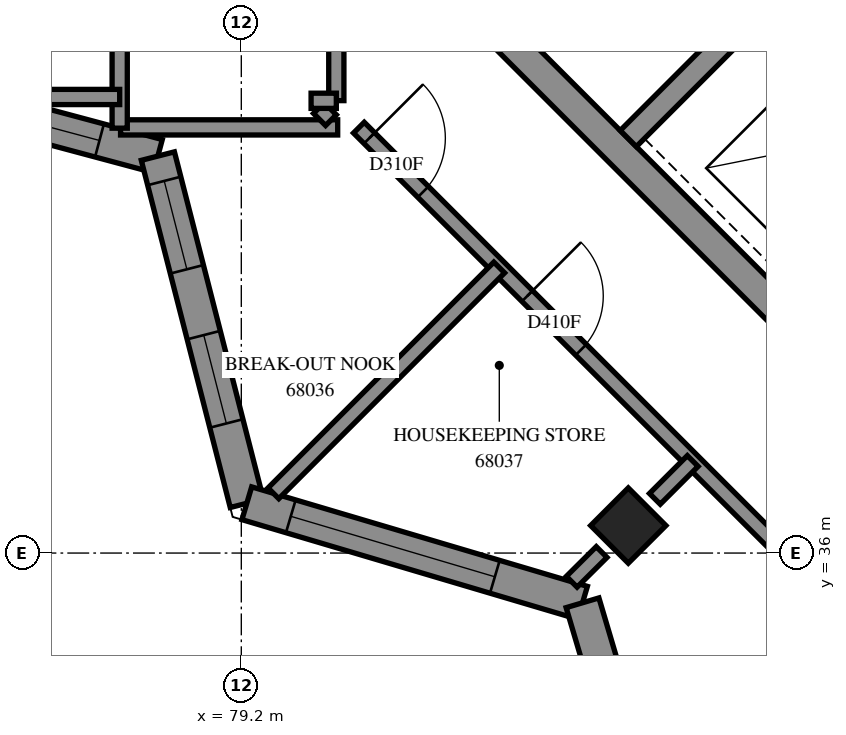
"""IFC4 building model, lengths in metres.
Left out: names, types, materials, properties, quantities, classifications, styles, units other than length and angle.
Written with IfcOpenShell. Run it as: python <this file> out.ifc"""

import sys

from ifc_helpers import new_model, si_unit, direction, frame, frame_2d, origin, origin_2d, place, context, subcontext, project, spatial, polyline, rectangle, outline, extrude, element, fill, save


model = new_model("IFC4")
c1 = context("Model", 3, precision=1e-05, world=origin(), true_north=direction((0.0, 1.0)))
c2 = subcontext(c1, "Body", "Model", "MODEL_VIEW")
j1 = project(units=[si_unit("LENGTHUNIT", "METRE"), si_unit("PLANEANGLEUNIT", "RADIAN")], contexts=[c1])
p1 = place(None, origin())
s1 = spatial("IfcSite", under=j1, at=p1, CompositionType="ELEMENT")
p2 = place(p1, origin())
s2 = spatial("IfcBuilding", under=s1, at=p2, CompositionType="ELEMENT")
p3 = place(p2, frame((0.0, 0.0, 250.6)))
s3 = spatial("IfcBuildingStorey", under=s2, at=p3, CompositionType="ELEMENT", Elevation=250.6)
p4 = place(p3, frame((84.291, 36.362, 0.0), z_axis=(0.0, 0.0, 1.0), x_axis=(0.7071067812, -0.7071067812, 0.0)))
e1 = element("IfcColumn", 1, at=p4, inside=s3, PredefinedType="COLUMN", context=c2, shape_type="SweptSolid", body=[
    extrude(rectangle(XDim=0.7, YDim=0.7, at=origin_2d()), origin(), (0.0, 0.0, 1.0), 3.1),
])
p5 = place(p3, frame((76.23, 49.231, -0.3), z_axis=(0.0, 0.0, 1.0), x_axis=(0.7071034917, -0.7071100706, 0.0)))
e2 = element("IfcWall", 2, at=p5, inside=s3, PredefinedType="SHEAR", context=c2, shape_type="SweptSolid", body=[
    extrude(rectangle(XDim=15.2, YDim=0.4, at=frame_2d((7.6, 0.0))), origin(), (0.0, 0.0, 1.0), 2.7),
])
p6 = place(p3, frame((84.291, 41.453, 0.0), z_axis=(0.0, 0.0, 1.0), x_axis=(0.7071067812, 0.7071067812, 0.0)))
e3 = element("IfcWall", 3, at=p6, inside=s3, PredefinedType="SOLIDWALL", context=c2, shape_type="SweptSolid", body=[
    extrude(rectangle(XDim=3.3, YDim=0.3, at=frame_2d((1.65, 0.0))), origin(), (0.0, 0.0, 1.0), 3.1),
])
p7 = place(p3, frame((78.988, 51.423, 0.0), z_axis=(0.0, 0.0, 1.0), x_axis=(0.7071067812, -0.7071067812, 0.0)))
e4 = element("IfcWall", 4, at=p7, inside=s3, PredefinedType="SOLIDWALL", context=c2, shape_type="SweptSolid", body=[
    extrude(rectangle(XDim=14.4, YDim=0.3, at=frame_2d((7.2, 0.0))), origin(), (0.0, 0.0, 1.0), 3.1),
])
p8 = place(p7, frame((1.35, 0.0, 0.0)))
e5 = element("IfcOpeningElement", 5, at=p8, cuts=e4, PredefinedType="OPENING", context=c2, shape_type="SweptSolid", body=[
    extrude(rectangle(XDim=0.9, YDim=2.1, at=frame_2d((0.45, 1.05))), frame((0.0, 0.16, 0.0), z_axis=(0.0, -1.0, 0.0), x_axis=(1.0, 0.0, 0.0)), (0.0, 0.0, 1.0), 0.32),
])
p9 = place(p7, frame((4.95, 0.0, 0.0)))
e6 = element("IfcOpeningElement", 6, at=p9, cuts=e4, PredefinedType="OPENING", context=c2, shape_type="SweptSolid", body=[
    extrude(rectangle(XDim=0.9, YDim=2.1, at=frame_2d((0.45, 1.05))), frame((0.0, 0.16, 0.0), z_axis=(0.0, -1.0, 0.0), x_axis=(1.0, 0.0, 0.0)), (0.0, 0.0, 1.0), 0.32),
])
p10 = place(p7, frame((8.55, 0.0, 0.0)))
e7 = element("IfcOpeningElement", 7, at=p10, cuts=e4, PredefinedType="OPENING", context=c2, shape_type="SweptSolid", body=[
    extrude(rectangle(XDim=0.9, YDim=2.1, at=frame_2d((0.45, 1.05))), frame((0.0, 0.16, 0.0), z_axis=(0.0, -1.0, 0.0), x_axis=(1.0, 0.0, 0.0)), (0.0, 0.0, 1.0), 0.32),
])
p11 = place(p7, frame((12.05, 0.0, 0.0)))
e8 = element("IfcOpeningElement", 8, at=p11, cuts=e4, PredefinedType="OPENING", context=c2, shape_type="SweptSolid", body=[
    extrude(rectangle(XDim=1.1, YDim=2.1, at=frame_2d((0.55, 1.05))), frame((0.0, 0.16, 0.0), z_axis=(0.0, -1.0, 0.0), x_axis=(1.0, 0.0, 0.0)), (0.0, 0.0, 1.0), 0.32),
])
p12 = place(p3, frame((74.346, 42.228, 0.0), z_axis=(0.0, 0.0, 1.0), x_axis=(0.9659805223, -0.2586148306, 0.0)))
e9 = element("IfcWall", 9, at=p12, inside=s3, PredefinedType="SOLIDWALL", context=c2, shape_type="SweptSolid", body=[
    extrude(outline(polyline([(0.041, -0.225), (3.757, -0.225), (4.02, 0.225), (-0.041, 0.225), (0.041, -0.225)])), origin(), (0.0, 0.0, 1.0), 3.1),
])
p13 = place(p12, frame((1.894, 0.0, 0.45)))
e10 = element("IfcOpeningElement", 10, at=p13, cuts=e9, PredefinedType="OPENING", context=c2, shape_type="SweptSolid", body=[
    extrude(rectangle(XDim=1.2, YDim=2.55, at=frame_2d((0.6, 1.275))), frame((0.0, 0.235, 0.0), z_axis=(0.0, -1.0, 0.0), x_axis=(1.0, 0.0, 0.0)), (0.0, 0.0, 1.0), 0.47),
])
p14 = place(p3, frame((78.102, 41.222, 0.0), z_axis=(0.0, 0.0, 1.0), x_axis=(0.2482207273, -0.9687034998, 0.0)))
e11 = element("IfcWall", 11, at=p14, inside=s3, PredefinedType="SOLIDWALL", context=c2, shape_type="SweptSolid", body=[
    extrude(outline(polyline([(0.132, -0.225), (4.842, -0.225), (4.587, 0.225), (-0.132, 0.225), (0.132, -0.225)])), origin(), (0.0, 0.0, 1.0), 3.1),
])
p15 = place(p14, frame((0.337, 0.0, 0.45)))
e12 = element("IfcOpeningElement", 12, at=p15, cuts=e11, PredefinedType="OPENING", context=c2, shape_type="SweptSolid", body=[
    extrude(rectangle(XDim=1.2, YDim=2.55, at=frame_2d((0.6, 1.275))), frame((0.0, 0.235, 0.0), z_axis=(0.0, -1.0, 0.0), x_axis=(1.0, 0.0, 0.0)), (0.0, 0.0, 1.0), 0.47),
])
p16 = place(p14, frame((2.431, 0.0, 0.45)))
e13 = element("IfcOpeningElement", 13, at=p16, cuts=e11, PredefinedType="OPENING", context=c2, shape_type="SweptSolid", body=[
    extrude(rectangle(XDim=1.2, YDim=2.55, at=frame_2d((0.6, 1.275))), frame((0.0, 0.235, 0.0), z_axis=(0.0, -1.0, 0.0), x_axis=(1.0, 0.0, 0.0)), (0.0, 0.0, 1.0), 0.47),
])
p17 = place(p3, frame((79.272, 36.655, 0.0), z_axis=(0.0, 0.0, 1.0), x_axis=(0.9587656954, -0.2841977151, 0.0)))
e14 = element("IfcWall", 14, at=p17, inside=s3, PredefinedType="SOLIDWALL", context=c2, shape_type="SweptSolid", body=[
    extrude(outline(polyline([(-0.128, -0.225), (4.484, -0.225), (4.729, 0.225), (0.128, 0.225), (-0.128, -0.225)])), origin(), (0.0, 0.0, 1.0), 3.1),
])
p18 = place(p17, frame((0.603, 0.0, 0.45)))
e15 = element("IfcOpeningElement", 15, at=p18, cuts=e14, PredefinedType="OPENING", context=c2, shape_type="SweptSolid", body=[
    extrude(rectangle(XDim=2.8, YDim=2.55, at=frame_2d((1.4, 1.275))), frame((0.0, 0.235, 0.0), z_axis=(0.0, -1.0, 0.0), x_axis=(1.0, 0.0, 0.0)), (0.0, 0.0, 1.0), 0.47),
])
p19 = place(p3, frame((83.689, 35.346, 0.0), z_axis=(0.0, 0.0, 1.0), x_axis=(0.2841977151, -0.9587656954, 0.0)))
e16 = element("IfcWall", 16, at=p19, inside=s3, PredefinedType="SOLIDWALL", context=c2, shape_type="SweptSolid", body=[
    extrude(outline(polyline([(0.122, -0.225), (4.734, -0.225), (4.479, 0.225), (-0.122, 0.225), (0.122, -0.225)])), origin(), (0.0, 0.0, 1.0), 3.1),
])
p20 = place(p19, frame((1.036, 0.0, 0.45)))
e17 = element("IfcOpeningElement", 17, at=p20, cuts=e16, PredefinedType="OPENING", context=c2, shape_type="SweptSolid", body=[
    extrude(rectangle(XDim=1.2, YDim=2.55, at=frame_2d((0.6, 1.275))), frame((0.0, 0.235, 0.0), z_axis=(0.0, -1.0, 0.0), x_axis=(1.0, 0.0, 0.0)), (0.0, 0.0, 1.0), 0.47),
])
p21 = place(p3, frame((84.939, 31.92, 0.0), z_axis=(0.0, 0.0, 1.0), x_axis=(0.7071067812, 0.7071067812, 0.0)))
e18 = element("IfcWall", 18, at=p21, inside=s3, PredefinedType="PARTITIONING", context=c2, shape_type="SweptSolid", body=[
    extrude(rectangle(XDim=11.283, YDim=0.2, at=frame_2d((5.641, 0.0))), origin(), (0.0, 0.0, 1.0), 3.1),
])
p22 = place(p3, frame((80.747, 41.597, 0.0), z_axis=(0.0, 0.0, 1.0), x_axis=(0.7071067812, -0.7071067812, 0.0)))
e19 = element("IfcWall", 19, at=p22, inside=s3, PredefinedType="PARTITIONING", context=c2, shape_type="SweptSolid", body=[
    extrude(rectangle(XDim=8.607, YDim=0.2, at=frame_2d((4.303, 0.0))), origin(), (0.0, 0.0, 1.0), 3.1),
])
p23 = place(p22, frame((0.195, 0.0, 0.0)))
e20 = element("IfcOpeningElement", 20, at=p23, cuts=e19, PredefinedType="OPENING", context=c2, shape_type="SweptSolid", body=[
    extrude(rectangle(XDim=1.0, YDim=2.1, at=frame_2d((0.5, 1.05))), frame((0.0, 0.11, 0.0), z_axis=(0.0, -1.0, 0.0), x_axis=(1.0, 0.0, 0.0)), (0.0, 0.0, 1.0), 0.22),
])
p24 = place(p22, frame((3.133, 0.0, 0.0)))
e21 = element("IfcOpeningElement", 21, at=p24, cuts=e19, PredefinedType="OPENING", context=c2, shape_type="SweptSolid", body=[
    extrude(rectangle(XDim=1.0, YDim=2.1, at=frame_2d((0.5, 1.05))), frame((0.0, 0.11, 0.0), z_axis=(0.0, -1.0, 0.0), x_axis=(1.0, 0.0, 0.0)), (0.0, 0.0, 1.0), 0.22),
])
p25 = place(p3, frame((79.623, 36.786, 0.0), z_axis=(0.0, 0.0, 1.0), x_axis=(0.7071186822, 0.7070948799, 0.0)))
e22 = element("IfcWall", 22, at=p25, inside=s3, PredefinedType="PARTITIONING", context=c2, shape_type="SweptSolid", body=[
    extrude(rectangle(XDim=4.201, YDim=0.2, at=frame_2d((2.101, 0.0))), origin(), (0.0, 0.0, 1.0), 3.1),
])
p26 = place(p3, frame((77.612, 41.6, 0.0), z_axis=(0.0, 0.0, 1.0), x_axis=(1.0, 0.0, 0.0)))
e23 = element("IfcWall", 23, at=p26, inside=s3, PredefinedType="PARTITIONING", context=c2, shape_type="SweptSolid", body=[
    extrude(rectangle(XDim=2.857, YDim=0.2, at=frame_2d((1.428, 0.0))), origin(), (0.0, 0.0, 1.0), 3.1),
])
p27 = place(p3, frame((77.6, 41.59, 0.0), z_axis=(0.0, 0.0, 1.0), x_axis=(0.0, 1.0, 0.0)))
e24 = element("IfcWall", 24, at=p27, inside=s3, PredefinedType="PARTITIONING", context=c2, shape_type="SweptSolid", body=[
    extrude(rectangle(XDim=2.878, YDim=0.2, at=frame_2d((1.439, 0.0))), origin(), (0.0, 0.0, 1.0), 3.1),
])
p28 = place(p3, frame((80.45, 41.952, 0.0), z_axis=(0.0, 0.0, 1.0), x_axis=(0.0, 1.0, 0.0)))
e25 = element("IfcWall", 25, at=p28, inside=s3, PredefinedType="PARTITIONING", context=c2, shape_type="SweptSolid", body=[
    extrude(rectangle(XDim=2.498, YDim=0.2, at=frame_2d((1.249, 0.0))), origin(), (0.0, 0.0, 1.0), 3.1),
])
p29 = place(p3, frame((76.117, 42.0, 0.0), z_axis=(0.0, 0.0, 1.0), x_axis=(1.0, 0.0, 0.0)))
e26 = element("IfcWall", 26, at=p29, inside=s3, PredefinedType="PARTITIONING", context=c2, shape_type="SweptSolid", body=[
    extrude(rectangle(XDim=1.483, YDim=0.2, at=frame_2d((0.741, 0.0))), origin(), (0.0, 0.0, 1.0), 3.1),
])
p30 = place(p3, frame((84.641, 36.713, 0.0), z_axis=(0.0, 0.0, 1.0), x_axis=(0.7071067812, 0.7071067812, 0.0)))
e27 = element("IfcWall", 27, at=p30, inside=s3, PredefinedType="PARTITIONING", context=c2, shape_type="SweptSolid", body=[
    extrude(rectangle(XDim=0.704, YDim=0.2, at=frame_2d((0.352, 0.0))), origin(), (0.0, 0.0, 1.0), 3.1),
])
p31 = place(p3, frame((83.547, 35.623, 0.0), z_axis=(0.0, 0.0, 1.0), x_axis=(0.7091778861, 0.7050295922, 0.0)))
e28 = element("IfcWall", 28, at=p31, inside=s3, PredefinedType="PARTITIONING", context=c2, shape_type="SweptSolid", body=[
    extrude(rectangle(XDim=0.554, YDim=0.2, at=frame_2d((0.277, 0.0))), origin(), (0.0, 0.0, 1.0), 3.1),
])
p32 = place(p3, frame((80.221, 41.855, 0.0), z_axis=(0.0, 0.0, 1.0), x_axis=(0.7068844555, -0.707329037, 0.0)))
e29 = element("IfcWall", 29, at=p32, inside=s3, PredefinedType="PARTITIONING", context=c2, shape_type="SweptSolid", body=[
    extrude(rectangle(XDim=0.225, YDim=0.2, at=frame_2d((0.112, 0.0))), origin(), (0.0, 0.0, 1.0), 3.1),
])
p33 = place(p3, frame((80.118, 41.95, 0.0), z_axis=(0.0, 0.0, 1.0), x_axis=(1.0, 0.0, 0.0)))
e30 = element("IfcWall", 30, at=p33, inside=s3, PredefinedType="PARTITIONING", context=c2, shape_type="SweptSolid", body=[
    extrude(rectangle(XDim=0.332, YDim=0.2, at=frame_2d((0.166, 0.0))), origin(), (0.0, 0.0, 1.0), 3.1),
])
p34 = place(p13, origin())
e31 = element("IfcWindow", 31, at=p34, inside=s3, PartitioningType="SINGLE_PANEL", PredefinedType="WINDOW", context=c2, shape_type="SweptSolid", body=[
    extrude(rectangle(XDim=1.2, YDim=2.55, at=frame_2d((0.6, 1.275))), frame((0.0, 0.135, 0.0), z_axis=(0.0, -1.0, 0.0), x_axis=(1.0, 0.0, 0.0)), (0.0, 0.0, 1.0), 0.06),
])
fill(e10, e31)
p35 = place(p15, origin())
e32 = element("IfcWindow", 32, at=p35, inside=s3, PartitioningType="SINGLE_PANEL", PredefinedType="WINDOW", context=c2, shape_type="SweptSolid", body=[
    extrude(rectangle(XDim=1.2, YDim=2.55, at=frame_2d((0.6, 1.275))), frame((0.0, 0.205, 0.0), z_axis=(0.0, -1.0, 0.0), x_axis=(1.0, 0.0, 0.0)), (0.0, 0.0, 1.0), 0.06),
])
fill(e12, e32)
p36 = place(p16, origin())
e33 = element("IfcWindow", 33, at=p36, inside=s3, PartitioningType="SINGLE_PANEL", PredefinedType="WINDOW", context=c2, shape_type="SweptSolid", body=[
    extrude(rectangle(XDim=1.2, YDim=2.55, at=frame_2d((0.6, 1.275))), frame((0.0, 0.205, 0.0), z_axis=(0.0, -1.0, 0.0), x_axis=(1.0, 0.0, 0.0)), (0.0, 0.0, 1.0), 0.06),
])
fill(e13, e33)
p37 = place(p18, origin())
e34 = element("IfcWindow", 34, at=p37, inside=s3, PartitioningType="SINGLE_PANEL", PredefinedType="WINDOW", context=c2, shape_type="SweptSolid", body=[
    extrude(rectangle(XDim=2.8, YDim=2.55, at=frame_2d((1.4, 1.275))), frame((0.0, 0.205, 0.0), z_axis=(0.0, -1.0, 0.0), x_axis=(1.0, 0.0, 0.0)), (0.0, 0.0, 1.0), 0.06),
])
fill(e15, e34)
p38 = place(p23, origin())
e35 = element("IfcDoor", 35, at=p38, inside=s3, OperationType="SINGLE_SWING_LEFT", PredefinedType="DOOR", context=c2, shape_type="SweptSolid", body=[
    extrude(rectangle(XDim=1.0, YDim=2.1, at=frame_2d((0.5, 1.05))), frame((0.0, 0.025, 0.0), z_axis=(0.0, -1.0, 0.0), x_axis=(1.0, 0.0, 0.0)), (0.0, 0.0, 1.0), 0.05),
])
fill(e20, e35)
p39 = place(p24, origin())
e36 = element("IfcDoor", 36, at=p39, inside=s3, OperationType="SINGLE_SWING_LEFT", PredefinedType="DOOR", context=c2, shape_type="SweptSolid", body=[
    extrude(rectangle(XDim=1.0, YDim=2.1, at=frame_2d((0.5, 1.05))), frame((0.0, 0.025, 0.0), z_axis=(0.0, -1.0, 0.0), x_axis=(1.0, 0.0, 0.0)), (0.0, 0.0, 1.0), 0.05),
])
fill(e21, e36)
save(model, sys.argv[1])
